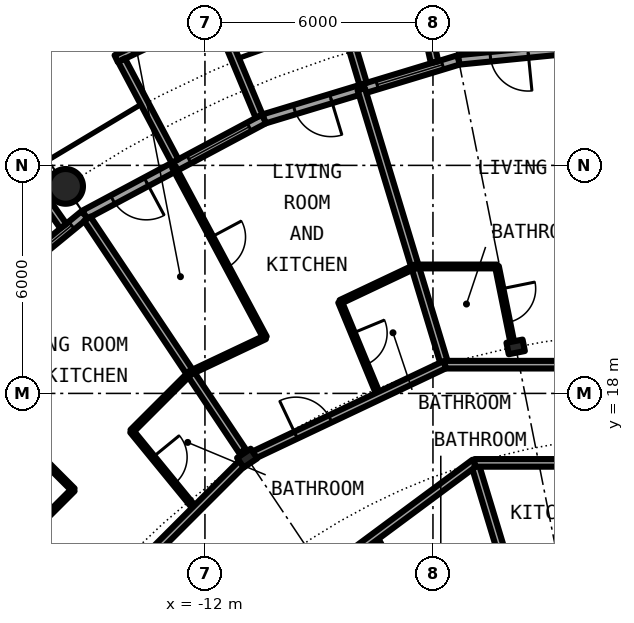
"""IFC4 building model, lengths in metres.
Left out: names, types, materials, properties, quantities, classifications, styles, units other than length and angle.
Written with IfcOpenShell. Run it as: python <this file> out.ifc"""

import sys

from ifc_helpers import new_model, si_unit, direction, frame, frame_2d, origin, origin_2d, place, context, subcontext, project, spatial, rectangle, circle, hollow_circle, i_section, extrude, element, fill, save


model = new_model("IFC4")
c1 = context("Model", 3, precision=1e-05, world=origin(), true_north=direction((0.0, 1.0)))
c2 = subcontext(c1, "Body", "Model", "MODEL_VIEW")
j1 = project(units=[si_unit("LENGTHUNIT", "METRE"), si_unit("PLANEANGLEUNIT", "RADIAN")], contexts=[c1])
p1 = place(None, origin())
s1 = spatial("IfcSite", under=j1, at=p1, CompositionType="ELEMENT")
p2 = place(p1, origin())
s2 = spatial("IfcBuilding", under=s1, at=p2, CompositionType="ELEMENT")
p3 = place(p2, frame((0.0, 0.0, 117.75)))
s3 = spatial("IfcBuildingStorey", under=s2, at=p3, CompositionType="ELEMENT", Elevation=117.75)
p4 = place(p3, frame((-15.667, 23.448, 0.0), z_axis=(0.0, 0.0, 1.0), x_axis=(1.0, 0.0, 0.0)))
e1 = element("IfcColumn", 1, at=p4, inside=s3, PredefinedType="COLUMN", context=c2, shape_type="SweptSolid", body=[
    extrude(hollow_circle(Radius=0.457, WallThickness=0.04, at=origin_2d()), origin(), (0.0, 0.0, 1.0), 3.05),
])
for number, where, z_axis, x_axis in (
    (2, (-3.824, 19.223, 0.0), (0.0, 0.0, 1.0), (-0.195, 0.981, 0.0)),
    (3, (-10.889, 16.297, 0.0), (0.0, 0.0, 1.0), (-0.556, 0.831, 0.0)),
):
    element("IfcColumn", number, at=place(p3, frame(where, z_axis=z_axis, x_axis=x_axis)), inside=s3, PredefinedType="COLUMN", context=c2, shape_type="SweptSolid", body=[
        extrude(i_section(OverallWidth=0.307, OverallDepth=0.432, WebThickness=0.021, FlangeThickness=0.04, FilletRadius=0.027, at=origin_2d()), origin(), (0.0, 0.0, 1.0), 3.05),
    ])
p5 = place(p3, frame((0.0, 27.3, 0.0), z_axis=(0.0, 0.0, 1.0), x_axis=(-0.995173996315, -0.098126026407, 0.0)))
e4 = element("IfcWall", 4, at=p5, inside=s3, PredefinedType="SOLIDWALL", context=c2, shape_type="SweptSolid", body=[
    extrude(rectangle(XDim=5.352, YDim=0.25, at=frame_2d((2.676, 0.0))), origin(), (0.0, 0.0, 1.0), 2.7),
])
p6 = place(p5, frame((0.441, 0.0, 0.3)))
e5 = element("IfcOpeningElement", 5, at=p6, cuts=e4, PredefinedType="OPENING", context=c2, shape_type="SweptSolid", body=[
    extrude(rectangle(XDim=1.8, YDim=2.1, at=frame_2d((0.9, 1.05))), frame((0.0, 0.135, 0.0), z_axis=(0.0, -1.0, 0.0), x_axis=(1.0, 0.0, 0.0)), (0.0, 0.0, 1.0), 0.27),
])
p7 = place(p5, frame((3.51, 0.0, 0.0)))
e6 = element("IfcOpeningElement", 6, at=p7, cuts=e4, PredefinedType="OPENING", context=c2, shape_type="SweptSolid", body=[
    extrude(rectangle(XDim=1.0, YDim=2.2, at=frame_2d((0.5, 1.1))), frame((0.0, 0.135, 0.0), z_axis=(0.0, -1.0, 0.0), x_axis=(1.0, 0.0, 0.0)), (0.0, 0.0, 1.0), 0.27),
])
p8 = place(p3, frame((-5.326, 26.775, 0.0), z_axis=(0.0, 0.0, 1.0), x_axis=(-0.956965678721, -0.290201119486, 0.0)))
e7 = element("IfcWall", 7, at=p8, inside=s3, PredefinedType="SOLIDWALL", context=c2, shape_type="SweptSolid", body=[
    extrude(rectangle(XDim=5.351, YDim=0.25, at=frame_2d((2.676, 0.0))), origin(), (0.0, 0.0, 1.0), 2.7),
])
p9 = place(p8, frame((0.441, 0.0, 0.3)))
e8 = element("IfcOpeningElement", 8, at=p9, cuts=e7, PredefinedType="OPENING", context=c2, shape_type="SweptSolid", body=[
    extrude(rectangle(XDim=1.8, YDim=2.1, at=frame_2d((0.9, 1.05))), frame((0.0, 0.135, 0.0), z_axis=(0.0, -1.0, 0.0), x_axis=(1.0, 0.0, 0.0)), (0.0, 0.0, 1.0), 0.27),
])
p10 = place(p8, frame((3.51, 0.0, 0.0)))
e9 = element("IfcOpeningElement", 9, at=p10, cuts=e7, PredefinedType="OPENING", context=c2, shape_type="SweptSolid", body=[
    extrude(rectangle(XDim=1.0, YDim=2.2, at=frame_2d((0.5, 1.1))), frame((0.0, 0.135, 0.0), z_axis=(0.0, -1.0, 0.0), x_axis=(1.0, 0.0, 0.0)), (0.0, 0.0, 1.0), 0.27),
])
p11 = place(p3, frame((-5.957, 26.715, -0.03), z_axis=(0.0, 0.0, 1.0), x_axis=(-0.217857287091, 0.975980636315, 0.0)))
e10 = element("IfcWall", 10, at=p11, inside=s3, PredefinedType="SOLIDWALL", context=c2, shape_type="SweptSolid", body=[
    extrude(rectangle(XDim=2.928, YDim=0.2, at=frame_2d((1.464, 0.0))), origin(), (0.0, 0.0, 1.0), 2.73),
])
p12 = place(p3, frame((-7.837, 26.144, -0.03), z_axis=(0.0, 0.0, 1.0), x_axis=(-0.287064767992, 0.957911174889, 0.0)))
e11 = element("IfcWall", 11, at=p12, inside=s3, PredefinedType="SOLIDWALL", context=c2, shape_type="SweptSolid", body=[
    extrude(rectangle(XDim=3.006, YDim=0.2, at=frame_2d((1.503, 0.0))), origin(), (0.0, 0.0, 1.0), 2.73),
])
p13 = place(p3, frame((-10.447, 25.222, 0.0), z_axis=(0.0, 0.0, 1.0), x_axis=(-0.881915646801, -0.471407246368, 0.0)))
e12 = element("IfcWall", 12, at=p13, inside=s3, PredefinedType="SOLIDWALL", context=c2, shape_type="SweptSolid", body=[
    extrude(rectangle(XDim=5.352, YDim=0.25, at=frame_2d((2.676, 0.0))), origin(), (0.0, 0.0, 1.0), 2.7),
])
p14 = place(p13, frame((0.441, 0.0, 0.3)))
e13 = element("IfcOpeningElement", 13, at=p14, cuts=e12, PredefinedType="OPENING", context=c2, shape_type="SweptSolid", body=[
    extrude(rectangle(XDim=1.8, YDim=2.1, at=frame_2d((0.9, 1.05))), frame((0.0, 0.135, 0.0), z_axis=(0.0, -1.0, 0.0), x_axis=(1.0, 0.0, 0.0)), (0.0, 0.0, 1.0), 0.27),
])
p15 = place(p13, frame((3.51, 0.0, 0.0)))
e14 = element("IfcOpeningElement", 14, at=p15, cuts=e12, PredefinedType="OPENING", context=c2, shape_type="SweptSolid", body=[
    extrude(rectangle(XDim=1.0, YDim=2.2, at=frame_2d((0.5, 1.1))), frame((0.0, 0.135, 0.0), z_axis=(0.0, -1.0, 0.0), x_axis=(1.0, 0.0, 0.0)), (0.0, 0.0, 1.0), 0.27),
])
p16 = place(p3, frame((-11.629, 28.088, -0.03), z_axis=(0.0, 0.0, 1.0), x_axis=(-0.904000060331, -0.427532327342, 0.0)))
e15 = element("IfcWall", 15, at=p16, inside=s3, PredefinedType="SOLIDWALL", context=c2, shape_type="SweptSolid", body=[
    extrude(rectangle(XDim=2.993, YDim=0.2, at=frame_2d((1.497, 0.0))), origin(), (0.0, 0.0, 1.0), 2.73),
])
p17 = place(p16, frame((0.457, 0.0, 0.33)))
e16 = element("IfcOpeningElement", 16, at=p17, cuts=e15, PredefinedType="OPENING", context=c2, shape_type="SweptSolid", body=[
    extrude(circle(Radius=1.04, at=frame_2d((1.04, 1.04))), frame((0.0, 0.11, 0.0), z_axis=(0.0, -1.0, 0.0), x_axis=(1.0, 0.0, 0.0)), (0.0, 0.0, 1.0), 0.22),
])
p18 = place(p3, frame((-10.575, 25.295, -0.03), z_axis=(0.0, 0.0, 1.0), x_axis=(-0.385697364644, 0.922625353492, 0.0)))
e17 = element("IfcWall", 17, at=p18, inside=s3, PredefinedType="SOLIDWALL", context=c2, shape_type="SweptSolid", body=[
    extrude(rectangle(XDim=2.883, YDim=0.2, at=frame_2d((1.442, 0.0))), origin(), (0.0, 0.0, 1.0), 2.73),
])
p19 = place(p3, frame((-12.787, 24.113, -0.03), z_axis=(0.0, 0.0, 1.0), x_axis=(-0.468365282436, 0.883534924159, 0.0)))
e18 = element("IfcWall", 18, at=p19, inside=s3, PredefinedType="SOLIDWALL", context=c2, shape_type="SweptSolid", body=[
    extrude(rectangle(XDim=3.006, YDim=0.2, at=frame_2d((1.503, 0.0))), origin(), (0.0, 0.0, 1.0), 2.73),
])
p20 = place(p3, frame((-15.167, 22.699, 0.0), z_axis=(0.0, 0.0, 1.0), x_axis=(-0.773019449054, -0.634382322723, 0.0)))
e19 = element("IfcWall", 19, at=p20, inside=s3, PredefinedType="SOLIDWALL", context=c2, shape_type="SweptSolid", body=[
    extrude(rectangle(XDim=5.352, YDim=0.25, at=frame_2d((2.676, 0.0))), origin(), (0.0, 0.0, 1.0), 2.7),
])
p21 = place(p20, frame((0.441, 0.0, 0.3)))
e20 = element("IfcOpeningElement", 20, at=p21, cuts=e19, PredefinedType="OPENING", context=c2, shape_type="SweptSolid", body=[
    extrude(rectangle(XDim=1.8, YDim=2.1, at=frame_2d((0.9, 1.05))), frame((0.0, 0.135, 0.0), z_axis=(0.0, -1.0, 0.0), x_axis=(1.0, 0.0, 0.0)), (0.0, 0.0, 1.0), 0.27),
])
p22 = place(p20, frame((3.51, 0.0, 0.0)))
e21 = element("IfcOpeningElement", 21, at=p22, cuts=e19, PredefinedType="OPENING", context=c2, shape_type="SweptSolid", body=[
    extrude(rectangle(XDim=1.0, YDim=2.2, at=frame_2d((0.5, 1.1))), frame((0.0, 0.135, 0.0), z_axis=(0.0, -1.0, 0.0), x_axis=(1.0, 0.0, 0.0)), (0.0, 0.0, 1.0), 0.27),
])
p23 = place(p3, frame((-15.726, 22.402, -0.03), z_axis=(0.0, 0.0, 1.0), x_axis=(-0.574826383135, 0.818275399393, 0.0)))
e22 = element("IfcWall", 22, at=p23, inside=s3, PredefinedType="SOLIDWALL", context=c2, shape_type="SweptSolid", body=[
    extrude(rectangle(XDim=2.929, YDim=0.2, at=frame_2d((1.465, 0.0))), origin(), (0.0, 0.0, 1.0), 2.73),
])
p24 = place(p3, frame((-7.887, 26.005, 0.0), z_axis=(0.0, 0.0, 1.0), x_axis=(0.29005838641, -0.957008951094, 0.0)))
e23 = element("IfcWall", 23, at=p24, inside=s3, PredefinedType="PARTITIONING", context=c2, shape_type="SweptSolid", body=[
    extrude(rectangle(XDim=7.574, YDim=0.2, at=frame_2d((3.787, 0.0))), origin(), (0.0, 0.0, 1.0), 2.7),
])
p25 = place(p3, frame((-4.907, 16.172, 0.0), z_axis=(0.0, 0.0, 1.0), x_axis=(0.289977130626, -0.957033575019, 0.0)))
e24 = element("IfcWall", 24, at=p25, inside=s3, PredefinedType="PARTITIONING", context=c2, shape_type="SweptSolid", body=[
    extrude(rectangle(XDim=9.18, YDim=0.2, at=frame_2d((4.59, 0.0))), origin(), (0.0, 0.0, 1.0), 2.7),
])
p26 = place(p3, frame((-19.216, 19.216, 0.0), z_axis=(0.0, 0.0, 1.0), x_axis=(0.707106781187, -0.707106781187, 0.0)))
e25 = element("IfcWall", 25, at=p26, inside=s3, PredefinedType="PARTITIONING", context=c2, shape_type="SweptSolid", body=[
    extrude(rectangle(XDim=5.305, YDim=0.1, at=frame_2d((2.652, 0.0))), origin(), (0.0, 0.0, 1.0), 2.7),
])
p27 = place(p26, frame((2.202, 0.0, 0.0)))
e26 = element("IfcOpeningElement", 26, at=p27, cuts=e25, PredefinedType="OPENING", context=c2, shape_type="SweptSolid", body=[
    extrude(rectangle(XDim=0.9, YDim=2.3, at=frame_2d((0.45, 1.15))), frame((0.0, 0.06, 0.0), z_axis=(0.0, -1.0, 0.0), x_axis=(1.0, 0.0, 0.0)), (0.0, 0.0, 1.0), 0.12),
])
p28 = place(p3, frame((-15.097, 22.595, 0.0), z_axis=(0.0, 0.0, 1.0), x_axis=(0.555572791, -0.831467903109, 0.0)))
e27 = element("IfcWall", 27, at=p28, inside=s3, PredefinedType="PARTITIONING", context=c2, shape_type="SweptSolid", body=[
    extrude(rectangle(XDim=7.358, YDim=0.2, at=frame_2d((3.679, 0.0))), origin(), (0.0, 0.0, 1.0), 2.7),
])
p29 = place(p3, frame((-13.927, 17.004, 0.0), z_axis=(0.0, 0.0, 1.0), x_axis=(0.633582447834, -0.77367517848, 0.0)))
e28 = element("IfcWall", 28, at=p29, inside=s3, PredefinedType="PARTITIONING", context=c2, shape_type="SweptSolid", body=[
    extrude(rectangle(XDim=2.661, YDim=0.1, at=frame_2d((1.331, 0.0))), origin(), (0.0, 0.0, 1.0), 2.7),
])
p30 = place(p29, frame((0.881, 0.0, 0.0)))
e29 = element("IfcOpeningElement", 29, at=p30, cuts=e28, PredefinedType="OPENING", context=c2, shape_type="SweptSolid", body=[
    extrude(rectangle(XDim=0.9, YDim=2.3, at=frame_2d((0.45, 1.15))), frame((0.0, 0.06, 0.0), z_axis=(0.0, -1.0, 0.0), x_axis=(1.0, 0.0, 0.0)), (0.0, 0.0, 1.0), 0.12),
])
p31 = place(p3, frame((-12.82, 23.961, 0.0), z_axis=(0.0, 0.0, 1.0), x_axis=(0.471735511233, -0.881740101981, 0.0)))
e30 = element("IfcWall", 30, at=p31, inside=s3, PredefinedType="PARTITIONING", context=c2, shape_type="SweptSolid", body=[
    extrude(rectangle(XDim=5.09, YDim=0.1, at=frame_2d((2.545, 0.0))), origin(), (0.0, 0.0, 1.0), 2.7),
])
p32 = place(p31, frame((2.095, 0.0, 0.0)))
e31 = element("IfcOpeningElement", 31, at=p32, cuts=e30, PredefinedType="OPENING", context=c2, shape_type="SweptSolid", body=[
    extrude(rectangle(XDim=0.9, YDim=2.3, at=frame_2d((0.45, 1.15))), frame((0.0, 0.06, 0.0), z_axis=(0.0, -1.0, 0.0), x_axis=(1.0, 0.0, 0.0)), (0.0, 0.0, 1.0), 0.12),
])
p33 = place(p3, frame((-8.445, 20.407, 0.0), z_axis=(0.0, 0.0, 1.0), x_axis=(0.382195876364, -0.924081334132, 0.0)))
e32 = element("IfcWall", 32, at=p33, inside=s3, PredefinedType="PARTITIONING", context=c2, shape_type="SweptSolid", body=[
    extrude(rectangle(XDim=2.674, YDim=0.1, at=frame_2d((1.337, 0.0))), origin(), (0.0, 0.0, 1.0), 2.7),
])
p34 = place(p33, frame((0.887, 0.0, 0.0)))
e33 = element("IfcOpeningElement", 33, at=p34, cuts=e32, PredefinedType="OPENING", context=c2, shape_type="SweptSolid", body=[
    extrude(rectangle(XDim=0.9, YDim=2.3, at=frame_2d((0.45, 1.15))), frame((0.0, 0.06, 0.0), z_axis=(0.0, -1.0, 0.0), x_axis=(1.0, 0.0, 0.0)), (0.0, 0.0, 1.0), 0.12),
])
p35 = place(p3, frame((-7.519, 14.234, 0.0), z_axis=(0.0, 0.0, 1.0), x_axis=(0.467001992543, -0.884256263173, 0.0)))
e34 = element("IfcWall", 34, at=p35, inside=s3, PredefinedType="PARTITIONING", context=c2, shape_type="SweptSolid", body=[
    extrude(rectangle(XDim=2.572, YDim=0.1, at=frame_2d((1.286, 0.0))), origin(), (0.0, 0.0, 1.0), 2.7),
])
p36 = place(p3, frame((-4.316, 21.34, 0.0), z_axis=(0.0, 0.0, 1.0), x_axis=(0.198348087074, -0.980131642359, 0.0)))
e35 = element("IfcWall", 35, at=p36, inside=s3, PredefinedType="PARTITIONING", context=c2, shape_type="SweptSolid", body=[
    extrude(rectangle(XDim=1.956, YDim=0.1, at=frame_2d((0.978, 0.0))), origin(), (0.0, 0.0, 1.0), 2.7),
])
p37 = place(p36, frame((0.6, 0.0, 0.0)))
e36 = element("IfcOpeningElement", 36, at=p37, cuts=e35, PredefinedType="OPENING", context=c2, shape_type="SweptSolid", body=[
    extrude(rectangle(XDim=0.9, YDim=2.3, at=frame_2d((0.45, 1.15))), frame((0.0, 0.06, 0.0), z_axis=(0.0, -1.0, 0.0), x_axis=(1.0, 0.0, 0.0)), (0.0, 0.0, 1.0), 0.12),
])
p38 = place(p3, frame((-14.052, 9.389, 0.0), z_axis=(0.0, 0.0, 1.0), x_axis=(0.803204584823, 0.59570327758, 0.0)))
e37 = element("IfcWall", 37, at=p38, inside=s3, PredefinedType="PARTITIONING", context=c2, shape_type="SweptSolid", body=[
    extrude(rectangle(XDim=11.387, YDim=0.2, at=frame_2d((5.693, 0.0))), origin(), (0.0, 0.0, 1.0), 2.7),
])
p39 = place(p38, frame((6.007, 0.0, 0.0)))
e38 = element("IfcOpeningElement", 38, at=p39, cuts=e37, PredefinedType="OPENING", context=c2, shape_type="SweptSolid", body=[
    extrude(rectangle(XDim=1.0, YDim=2.3, at=frame_2d((0.5, 1.15))), frame((0.0, 0.11, 0.0), z_axis=(0.0, -1.0, 0.0), x_axis=(1.0, 0.0, 0.0)), (0.0, 0.0, 1.0), 0.22),
])
p40 = place(p3, frame((-4.906, 16.172, 0.0), z_axis=(0.0, 0.0, 1.0), x_axis=(1.0, 0.0, 0.0)))
e39 = element("IfcWall", 39, at=p40, inside=s3, PredefinedType="PARTITIONING", context=c2, shape_type="SweptSolid", body=[
    extrude(rectangle(XDim=9.812, YDim=0.2, at=frame_2d((4.906, 0.0))), origin(), (0.0, 0.0, 1.0), 2.7),
])
p41 = place(p40, frame((4.406, 0.0, 0.0)))
e40 = element("IfcOpeningElement", 40, at=p41, cuts=e39, PredefinedType="OPENING", context=c2, shape_type="SweptSolid", body=[
    extrude(rectangle(XDim=1.0, YDim=2.3, at=frame_2d((0.5, 1.15))), frame((0.0, 0.11, 0.0), z_axis=(0.0, -1.0, 0.0), x_axis=(1.0, 0.0, 0.0)), (0.0, 0.0, 1.0), 0.22),
])
p42 = place(p3, frame((-5.69, 18.756, 0.0), z_axis=(0.0, 0.0, 1.0), x_axis=(1.0, 0.0, 0.0)))
e41 = element("IfcWall", 41, at=p42, inside=s3, PredefinedType="PARTITIONING", context=c2, shape_type="SweptSolid", body=[
    extrude(rectangle(XDim=11.38, YDim=0.2, at=frame_2d((5.69, 0.0))), origin(), (0.0, 0.0, 1.0), 2.7),
])
p43 = place(p42, frame((3.294, 0.0, 0.0)))
e42 = element("IfcOpeningElement", 42, at=p43, cuts=e41, PredefinedType="OPENING", context=c2, shape_type="SweptSolid", body=[
    extrude(rectangle(XDim=1.0, YDim=2.3, at=frame_2d((0.5, 1.15))), frame((0.0, 0.11, 0.0), z_axis=(0.0, -1.0, 0.0), x_axis=(1.0, 0.0, 0.0)), (0.0, 0.0, 1.0), 0.22),
])
p44 = place(p3, frame((-16.186, 11.0, 0.0), z_axis=(0.0, 0.0, 1.0), x_axis=(0.707106781187, 0.707106781187, 0.0)))
e43 = element("IfcWall", 43, at=p44, inside=s3, PredefinedType="PARTITIONING", context=c2, shape_type="SweptSolid", body=[
    extrude(rectangle(XDim=7.334, YDim=0.2, at=frame_2d((3.667, 0.0))), origin(), (0.0, 0.0, 1.0), 2.39),
])
p45 = place(p44, frame((2.211, 0.0, 0.0)))
e44 = element("IfcOpeningElement", 44, at=p45, cuts=e43, PredefinedType="OPENING", context=c2, shape_type="SweptSolid", body=[
    extrude(rectangle(XDim=1.0, YDim=2.3, at=frame_2d((0.5, 1.15))), frame((0.0, 0.11, 0.0), z_axis=(0.0, -1.0, 0.0), x_axis=(1.0, 0.0, 0.0)), (0.0, 0.0, 1.0), 0.22),
])
p46 = place(p3, frame((-10.748, 16.362, 0.0), z_axis=(0.0, 0.0, 1.0), x_axis=(0.903869270233, 0.427808768409, 0.0)))
e45 = element("IfcWall", 45, at=p46, inside=s3, PredefinedType="PARTITIONING", context=c2, shape_type="SweptSolid", body=[
    extrude(rectangle(XDim=5.596, YDim=0.2, at=frame_2d((2.798, 0.0))), origin(), (0.0, 0.0, 1.0), 2.39),
])
p47 = place(p46, frame((1.262, 0.0, 0.0)))
e46 = element("IfcOpeningElement", 46, at=p47, cuts=e45, PredefinedType="OPENING", context=c2, shape_type="SweptSolid", body=[
    extrude(rectangle(XDim=1.0, YDim=2.3, at=frame_2d((0.5, 1.15))), frame((0.0, 0.11, 0.0), z_axis=(0.0, -1.0, 0.0), x_axis=(1.0, 0.0, 0.0)), (0.0, 0.0, 1.0), 0.22),
])
p48 = place(p3, frame((-6.473, 21.34, 0.0), z_axis=(0.0, 0.0, 1.0), x_axis=(1.0, 0.0, 0.0)))
e47 = element("IfcWall", 47, at=p48, inside=s3, PredefinedType="PARTITIONING", context=c2, shape_type="SweptSolid", body=[
    extrude(rectangle(XDim=2.157, YDim=0.1, at=frame_2d((1.079, 0.0))), origin(), (0.0, 0.0, 1.0), 2.7),
])
p49 = place(p3, frame((-18.542, 12.389, 0.0), z_axis=(0.0, 0.0, 1.0), x_axis=(0.707190945535, 0.707022606819, 0.0)))
e48 = element("IfcWall", 48, at=p49, inside=s3, PredefinedType="PARTITIONING", context=c2, shape_type="SweptSolid", body=[
    extrude(rectangle(XDim=4.351, YDim=0.1, at=frame_2d((2.175, 0.0))), origin(), (0.0, 0.0, 1.0), 2.7),
])
p50 = place(p49, frame((0.639, 0.0, 0.0)))
e49 = element("IfcOpeningElement", 49, at=p50, cuts=e48, PredefinedType="OPENING", context=c2, shape_type="SweptSolid", body=[
    extrude(rectangle(XDim=0.9, YDim=2.3, at=frame_2d((0.45, 1.15))), frame((0.0, 0.06, 0.0), z_axis=(0.0, -1.0, 0.0), x_axis=(1.0, 0.0, 0.0)), (0.0, 0.0, 1.0), 0.12),
])
p51 = place(p3, frame((-13.924, 17.006, 0.0), z_axis=(0.0, 0.0, 1.0), x_axis=(0.707387256653, 0.706826194425, 0.0)))
e50 = element("IfcWall", 50, at=p51, inside=s3, PredefinedType="PARTITIONING", context=c2, shape_type="SweptSolid", body=[
    extrude(rectangle(XDim=2.176, YDim=0.1, at=frame_2d((1.088, 0.0))), origin(), (0.0, 0.0, 1.0), 2.7),
])
for number, where, z_axis, x_axis in (
    (51, (-12.389, 18.542, 0.0), (0.0, 0.0, 1.0), (0.904, 0.427, 0.0)),
    (52, (-8.436, 20.41, 0.0), (0.0, 0.0, 1.0), (0.904, 0.427, 0.0)),
):
    element("IfcWall", number, at=place(p3, frame(where, z_axis=z_axis, x_axis=x_axis)), inside=s3, PredefinedType="PARTITIONING", context=c2, shape_type="SweptSolid", body=[
        extrude(rectangle(XDim=2.181, YDim=0.1, at=frame_2d((1.091, 0.0))), origin(), (0.0, 0.0, 1.0), 2.7),
    ])
p52 = place(p7, origin())
e53 = element("IfcDoor", 53, at=p52, inside=s3, OperationType="SINGLE_SWING_LEFT", PredefinedType="DOOR", context=c2, shape_type="SweptSolid", body=[
    extrude(rectangle(XDim=1.0, YDim=2.2, at=frame_2d((0.5, 1.1))), frame((0.0, 0.025, 0.0), z_axis=(0.0, -1.0, 0.0), x_axis=(1.0, 0.0, 0.0)), (0.0, 0.0, 1.0), 0.05),
])
fill(e6, e53)
p53 = place(p9, origin())
e54 = element("IfcWindow", 54, at=p53, inside=s3, PartitioningType="SINGLE_PANEL", PredefinedType="WINDOW", context=c2, shape_type="SweptSolid", body=[
    extrude(rectangle(XDim=1.8, YDim=2.1, at=frame_2d((0.9, 1.05))), frame((0.0, 0.03, 0.0), z_axis=(0.0, -1.0, 0.0), x_axis=(1.0, 0.0, 0.0)), (0.0, 0.0, 1.0), 0.06),
])
fill(e8, e54)
p54 = place(p10, origin())
e55 = element("IfcDoor", 55, at=p54, inside=s3, OperationType="SINGLE_SWING_LEFT", PredefinedType="DOOR", context=c2, shape_type="SweptSolid", body=[
    extrude(rectangle(XDim=1.0, YDim=2.2, at=frame_2d((0.5, 1.1))), frame((0.0, 0.025, 0.0), z_axis=(0.0, -1.0, 0.0), x_axis=(1.0, 0.0, 0.0)), (0.0, 0.0, 1.0), 0.05),
])
fill(e9, e55)
p55 = place(p14, origin())
e56 = element("IfcWindow", 56, at=p55, inside=s3, PartitioningType="SINGLE_PANEL", PredefinedType="WINDOW", context=c2, shape_type="SweptSolid", body=[
    extrude(rectangle(XDim=1.8, YDim=2.1, at=frame_2d((0.9, 1.05))), frame((0.0, 0.03, 0.0), z_axis=(0.0, -1.0, 0.0), x_axis=(1.0, 0.0, 0.0)), (0.0, 0.0, 1.0), 0.06),
])
fill(e13, e56)
p56 = place(p15, origin())
e57 = element("IfcDoor", 57, at=p56, inside=s3, OperationType="SINGLE_SWING_LEFT", PredefinedType="DOOR", context=c2, shape_type="SweptSolid", body=[
    extrude(rectangle(XDim=1.0, YDim=2.2, at=frame_2d((0.5, 1.1))), frame((0.0, 0.025, 0.0), z_axis=(0.0, -1.0, 0.0), x_axis=(1.0, 0.0, 0.0)), (0.0, 0.0, 1.0), 0.05),
])
fill(e14, e57)
p57 = place(p21, origin())
e58 = element("IfcWindow", 58, at=p57, inside=s3, PartitioningType="SINGLE_PANEL", PredefinedType="WINDOW", context=c2, shape_type="SweptSolid", body=[
    extrude(rectangle(XDim=1.8, YDim=2.1, at=frame_2d((0.9, 1.05))), frame((0.0, 0.03, 0.0), z_axis=(0.0, -1.0, 0.0), x_axis=(1.0, 0.0, 0.0)), (0.0, 0.0, 1.0), 0.06),
])
fill(e20, e58)
p58 = place(p37, origin())
e59 = element("IfcDoor", 59, at=p58, inside=s3, OperationType="SINGLE_SWING_RIGHT", PredefinedType="DOOR", context=c2, shape_type="SweptSolid", body=[
    extrude(rectangle(XDim=0.9, YDim=2.3, at=frame_2d((0.45, 1.15))), frame((0.0, 0.025, 0.0), z_axis=(0.0, -1.0, 0.0), x_axis=(1.0, 0.0, 0.0)), (0.0, 0.0, 1.0), 0.05),
])
fill(e36, e59)
p59 = place(p47, origin())
e60 = element("IfcDoor", 60, at=p59, inside=s3, OperationType="SINGLE_SWING_LEFT", PredefinedType="DOOR", context=c2, shape_type="SweptSolid", body=[
    extrude(rectangle(XDim=1.0, YDim=2.3, at=frame_2d((0.5, 1.15))), frame((0.0, 0.025, 0.0), z_axis=(0.0, -1.0, 0.0), x_axis=(1.0, 0.0, 0.0)), (0.0, 0.0, 1.0), 0.05),
])
fill(e46, e60)
p60 = place(p34, origin())
e61 = element("IfcDoor", 61, at=p60, inside=s3, OperationType="SINGLE_SWING_RIGHT", PredefinedType="DOOR", context=c2, shape_type="SweptSolid", body=[
    extrude(rectangle(XDim=0.9, YDim=2.3, at=frame_2d((0.45, 1.15))), frame((0.0, 0.025, 0.0), z_axis=(0.0, -1.0, 0.0), x_axis=(1.0, 0.0, 0.0)), (0.0, 0.0, 1.0), 0.05),
])
fill(e33, e61)
p61 = place(p32, origin())
e62 = element("IfcDoor", 62, at=p61, inside=s3, OperationType="SINGLE_SWING_RIGHT", PredefinedType="DOOR", context=c2, shape_type="SweptSolid", body=[
    extrude(rectangle(XDim=0.9, YDim=2.3, at=frame_2d((0.45, 1.15))), frame((0.0, 0.025, 0.0), z_axis=(0.0, -1.0, 0.0), x_axis=(1.0, 0.0, 0.0)), (0.0, 0.0, 1.0), 0.05),
])
fill(e31, e62)
p62 = place(p30, origin())
e63 = element("IfcDoor", 63, at=p62, inside=s3, OperationType="SINGLE_SWING_RIGHT", PredefinedType="DOOR", context=c2, shape_type="SweptSolid", body=[
    extrude(rectangle(XDim=0.9, YDim=2.3, at=frame_2d((0.45, 1.15))), frame((0.0, 0.025, 0.0), z_axis=(0.0, -1.0, 0.0), x_axis=(1.0, 0.0, 0.0)), (0.0, 0.0, 1.0), 0.05),
])
fill(e29, e63)
save(model, sys.argv[1])
